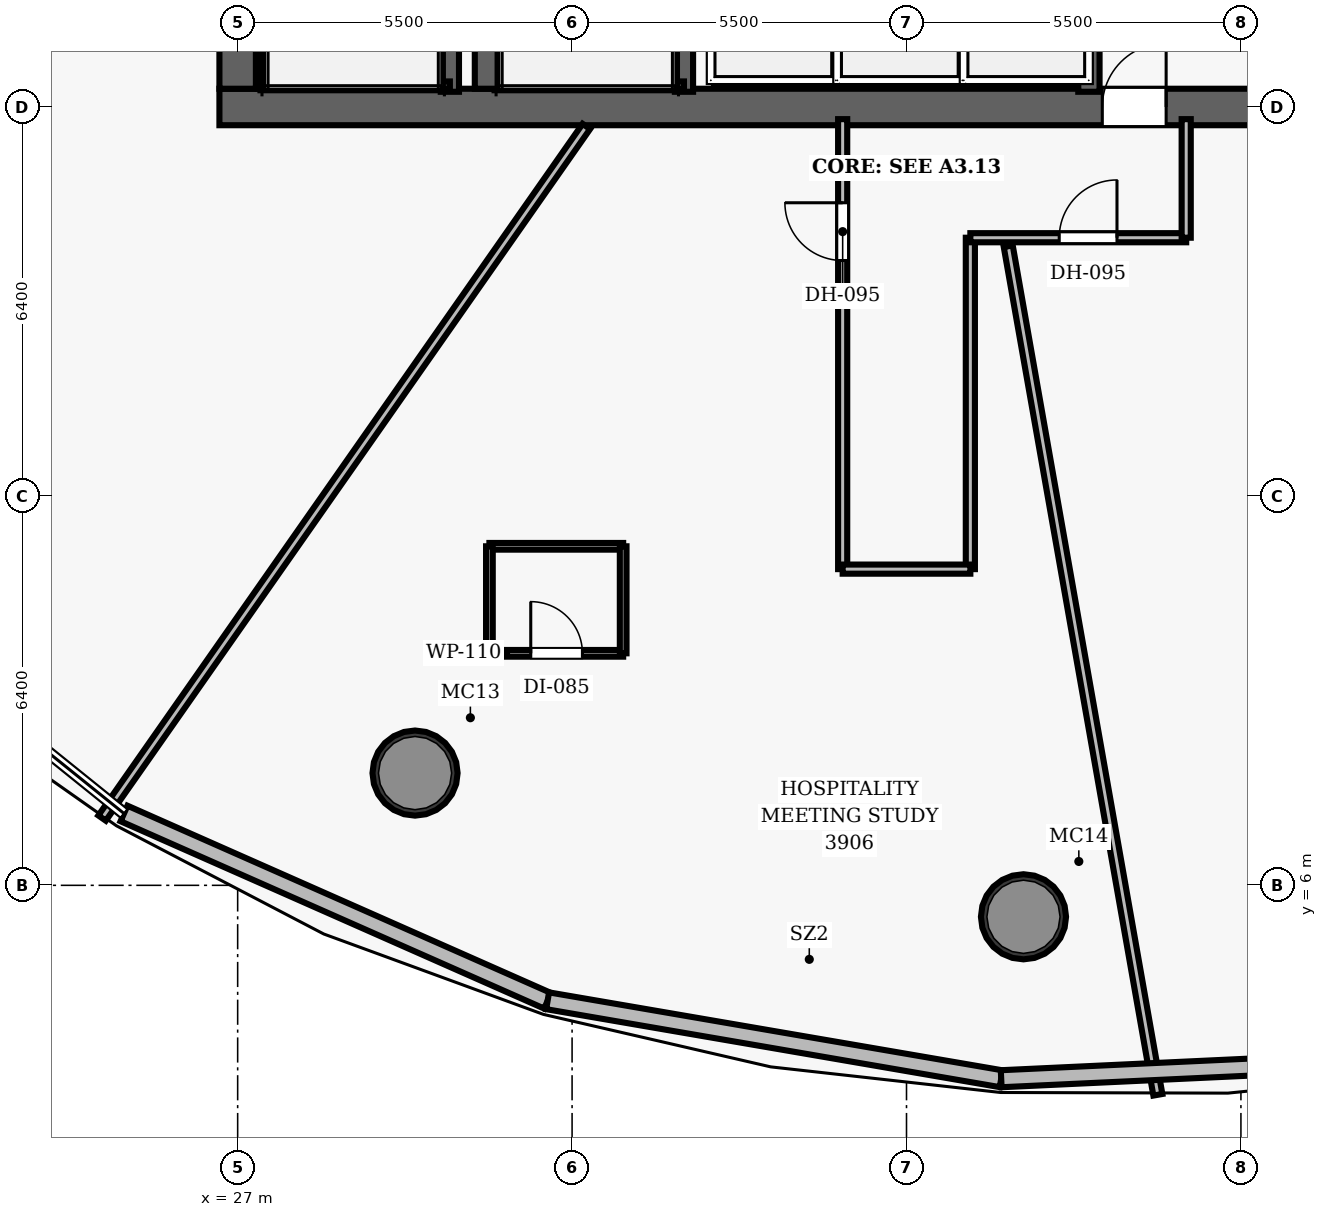
"""IFC4 building model, lengths in metres.
Left out: names, types, materials, properties, quantities, classifications, styles, units other than length and angle.
Written with IfcOpenShell. Run it as: python <this file> out.ifc"""

import sys

from ifc_helpers import new_model, si_unit, direction, frame, frame_2d, origin, origin_2d, place, context, subcontext, project, spatial, rectangle, hollow_circle, extrude, element, fill, save


model = new_model("IFC4")
c1 = context("Model", 3, precision=1e-05, world=origin(), true_north=direction((0.0, 1.0)))
c2 = subcontext(c1, "Body", "Model", "MODEL_VIEW")
j1 = project(units=[si_unit("LENGTHUNIT", "METRE"), si_unit("PLANEANGLEUNIT", "RADIAN")], contexts=[c1])
p1 = place(None, origin())
s1 = spatial("IfcSite", under=j1, at=p1, CompositionType="ELEMENT")
p2 = place(p1, origin())
s2 = spatial("IfcBuilding", under=s1, at=p2, CompositionType="ELEMENT")
p3 = place(p2, frame((0.0, 0.0, 155.3)))
s3 = spatial("IfcBuildingStorey", under=s2, at=p3, CompositionType="ELEMENT", Elevation=155.3)
p4 = place(p3, frame((26.7, 18.8, 0.0), z_axis=(0.0, 0.0, 1.0), x_axis=(1.0, 0.0, 0.0)))
e1 = element("IfcWall", 1, at=p4, inside=s3, PredefinedType="SHEAR", context=c2, shape_type="SweptSolid", body=[
    extrude(rectangle(XDim=22.6, YDim=0.6, at=frame_2d((11.3, 0.0))), origin(), (0.0, 0.0, 1.0), 3.5),
])
p5 = place(p4, frame((14.52, 0.0, 0.0)))
e2 = element("IfcOpeningElement", 2, at=p5, cuts=e1, PredefinedType="OPENING", context=c2, shape_type="SweptSolid", body=[
    extrude(rectangle(XDim=1.05, YDim=2.15, at=frame_2d((0.525, 1.075))), frame((0.0, 0.31, 0.0), z_axis=(0.0, -1.0, 0.0), x_axis=(1.0, 0.0, 0.0)), (0.0, 0.0, 1.0), 0.62),
])
p6 = place(p3, frame((27.0, 19.1, 0.0), z_axis=(0.0, 0.0, 1.0), x_axis=(0.0, 1.0, 0.0)))
e3 = element("IfcWall", 3, at=p6, inside=s3, PredefinedType="SHEAR", context=c2, shape_type="SweptSolid", body=[
    extrude(rectangle(XDim=13.8, YDim=0.6, at=frame_2d((6.9, 0.0))), origin(), (0.0, 0.0, 1.0), 3.5),
])
p7 = place(p6, frame((8.2, 0.0, 0.0)))
e4 = element("IfcOpeningElement", 4, at=p7, cuts=e3, PredefinedType="OPENING", context=c2, shape_type="SweptSolid", body=[
    extrude(rectangle(XDim=1.05, YDim=2.15, at=frame_2d((0.525, 1.075))), frame((0.0, 0.31, 0.0), z_axis=(0.0, -1.0, 0.0), x_axis=(1.0, 0.0, 0.0)), (0.0, 0.0, 1.0), 0.62),
])
p8 = place(p3, frame((31.1, 19.1, 0.0), z_axis=(0.0, 0.0, 1.0), x_axis=(0.0, 1.0, 0.0)))
e5 = element("IfcWall", 5, at=p8, inside=s3, PredefinedType="SHEAR", context=c2, shape_type="SweptSolid", body=[
    extrude(rectangle(XDim=13.8, YDim=0.4, at=frame_2d((6.9, 0.0))), origin(), (0.0, 0.0, 1.0), 3.5),
])
for number, where, z_axis, x_axis in (
    (6, (29.917, 7.846, 0.0), (0.0, 0.0, 1.0), (1.0, 0.0, 0.0)),
    (7, (39.924, 5.483, 0.0), (0.0, 0.0, 1.0), (1.0, 0.0, 0.0)),
):
    element("IfcColumn", number, at=place(p3, frame(where, z_axis=z_axis, x_axis=x_axis)), inside=s3, PredefinedType="COLUMN", context=c2, shape_type="SweptSolid", body=[
        extrude(hollow_circle(Radius=0.7, WallThickness=0.055, at=origin_2d()), origin(), (0.0, 0.0, 1.0), 3.5),
    ])
p9 = place(p3, frame((30.49, 19.05, 0.0), z_axis=(0.0, 0.0, 1.0), x_axis=(0.0, 1.0, 0.0)))
e8 = element("IfcWall", 8, at=p9, inside=s3, PredefinedType="SHEAR", context=c2, shape_type="SweptSolid", body=[
    extrude(rectangle(XDim=7.5, YDim=0.3, at=frame_2d((3.75, 0.0))), origin(), (0.0, 0.0, 1.0), 3.5),
])
p10 = place(p3, frame((27.395, 19.1, 0.0), z_axis=(0.0, 0.0, 1.0), x_axis=(0.0, 1.0, 0.0)))
e9 = element("IfcWall", 9, at=p10, inside=s3, PredefinedType="SHEAR", context=c2, shape_type="SweptSolid", body=[
    extrude(rectangle(XDim=7.45, YDim=0.12, at=frame_2d((3.725, 0.0))), origin(), (0.0, 0.0, 1.0), 3.5),
])
p11 = place(p3, frame((27.395, 19.16, 0.0), z_axis=(0.0, 0.0, 1.0), x_axis=(1.0, 0.0, 0.0)))
e10 = element("IfcWall", 10, at=p11, inside=s3, PredefinedType="SHEAR", context=c2, shape_type="SweptSolid", body=[
    extrude(rectangle(XDim=3.095, YDim=0.12, at=frame_2d((1.547, 0.0))), origin(), (0.0, 0.0, 1.0), 3.5),
])
p12 = place(p3, frame((34.34, 19.05, 0.0), z_axis=(0.0, 0.0, 1.0), x_axis=(0.0, 1.0, 0.0)))
e11 = element("IfcWall", 11, at=p12, inside=s3, PredefinedType="SHEAR", context=c2, shape_type="SweptSolid", body=[
    extrude(rectangle(XDim=7.5, YDim=0.3, at=frame_2d((3.75, 0.0))), origin(), (0.0, 0.0, 1.0), 3.5),
])
p13 = place(p3, frame((31.3, 19.16, 0.0), z_axis=(0.0, 0.0, 1.0), x_axis=(1.0, 0.0, 0.0)))
e12 = element("IfcWall", 12, at=p13, inside=s3, PredefinedType="SHEAR", context=c2, shape_type="SweptSolid", body=[
    extrude(rectangle(XDim=3.04, YDim=0.12, at=frame_2d((1.52, 0.0))), origin(), (0.0, 0.0, 1.0), 3.5),
])
p14 = place(p3, frame((41.0, 19.05, 0.0), z_axis=(0.0, 0.0, 1.0), x_axis=(0.0, 1.0, 0.0)))
e13 = element("IfcWall", 13, at=p14, inside=s3, PredefinedType="SHEAR", context=c2, shape_type="SweptSolid", body=[
    extrude(rectangle(XDim=2.08, YDim=0.35, at=frame_2d((1.04, 0.0))), origin(), (0.0, 0.0, 1.0), 2.675),
])
p15 = place(p3, frame((36.95, 11.2, 0.0), z_axis=(0.0, 0.0, 1.0), x_axis=(0.0, 1.0, 0.0)))
e14 = element("IfcWall", 14, at=p15, inside=s3, PredefinedType="PARTITIONING", context=c2, shape_type="SweptSolid", body=[
    extrude(rectangle(XDim=7.4, YDim=0.15, at=frame_2d((3.7, 0.0))), origin(), (0.0, 0.0, 1.0), 2.675),
])
p16 = place(p15, frame((5.075, 0.0, 0.0)))
e15 = element("IfcOpeningElement", 15, at=p16, cuts=e14, PredefinedType="OPENING", context=c2, shape_type="SweptSolid", body=[
    extrude(rectangle(XDim=0.95, YDim=2.15, at=frame_2d((0.475, 1.075))), frame((0.0, 0.085, 0.0), z_axis=(0.0, -1.0, 0.0), x_axis=(1.0, 0.0, 0.0)), (0.0, 0.0, 1.0), 0.17),
])
p17 = place(p3, frame((39.05, 11.2, 0.0), z_axis=(0.0, 0.0, 1.0), x_axis=(0.0, 1.0, 0.0)))
e16 = element("IfcWall", 16, at=p17, inside=s3, PredefinedType="PARTITIONING", context=c2, shape_type="SweptSolid", body=[
    extrude(rectangle(XDim=5.45, YDim=0.15, at=frame_2d((2.725, 0.0))), origin(), (0.0, 0.0, 1.0), 2.675),
])
p18 = place(p3, frame((39.05, 16.65, 0.0), z_axis=(0.0, 0.0, 1.0), x_axis=(1.0, 0.0, 0.0)))
e17 = element("IfcWall", 17, at=p18, inside=s3, PredefinedType="PARTITIONING", context=c2, shape_type="SweptSolid", body=[
    extrude(rectangle(XDim=3.55, YDim=0.15, at=frame_2d((1.775, 0.0))), origin(), (0.0, 0.0, 1.0), 2.675),
])
p19 = place(p18, frame((1.462, 0.0, 0.0)))
e18 = element("IfcOpeningElement", 18, at=p19, cuts=e17, PredefinedType="OPENING", context=c2, shape_type="SweptSolid", body=[
    extrude(rectangle(XDim=0.95, YDim=2.15, at=frame_2d((0.475, 1.075))), frame((0.0, 0.085, 0.0), z_axis=(0.0, -1.0, 0.0), x_axis=(1.0, 0.0, 0.0)), (0.0, 0.0, 1.0), 0.17),
])
p20 = place(p3, frame((42.6, 16.65, 0.0), z_axis=(0.0, 0.0, 1.0), x_axis=(0.0, 1.0, 0.0)))
e19 = element("IfcWall", 19, at=p20, inside=s3, PredefinedType="PARTITIONING", context=c2, shape_type="SweptSolid", body=[
    extrude(rectangle(XDim=1.95, YDim=0.15, at=frame_2d((0.975, 0.0))), origin(), (0.0, 0.0, 1.0), 2.675),
])
p21 = place(p3, frame((36.95, 11.2, 0.0), z_axis=(0.0, 0.0, 1.0), x_axis=(1.0, 0.0, 0.0)))
e20 = element("IfcWall", 20, at=p21, inside=s3, PredefinedType="PARTITIONING", context=c2, shape_type="SweptSolid", body=[
    extrude(rectangle(XDim=2.1, YDim=0.15, at=frame_2d((1.05, 0.0))), origin(), (0.0, 0.0, 1.0), 2.675),
])
p22 = place(p3, frame((32.734, 18.48, 0.0), z_axis=(0.0, 0.0, 1.0), x_axis=(-0.573573265071, -0.819154264834, 0.0)))
e21 = element("IfcWall", 21, at=p22, inside=s3, PredefinedType="PARTITIONING", context=c2, shape_type="SweptSolid", body=[
    extrude(rectangle(XDim=13.885, YDim=0.15, at=frame_2d((6.942, 0.0))), origin(), (0.0, 0.0, 1.0), 2.675),
])
p23 = place(p3, frame((39.673, 16.51, 0.0), z_axis=(0.0, 0.0, 1.0), x_axis=(0.173639863348, -0.984809219015, 0.0)))
e22 = element("IfcWall", 22, at=p23, inside=s3, PredefinedType="PARTITIONING", context=c2, shape_type="SweptSolid", body=[
    extrude(rectangle(XDim=14.17, YDim=0.15, at=frame_2d((7.085, 0.0))), origin(), (0.0, 0.0, 1.0), 2.675),
])
p24 = place(p3, frame((31.14, 9.815, 0.0), z_axis=(0.0, 0.0, 1.0), x_axis=(1.0, 0.0, 0.0)))
e23 = element("IfcWall", 23, at=p24, inside=s3, PredefinedType="PARTITIONING", context=c2, shape_type="SweptSolid", body=[
    extrude(rectangle(XDim=2.2, YDim=0.11, at=frame_2d((1.1, 0.0))), origin(), (0.0, 0.0, 1.0), 2.675),
])
p25 = place(p24, frame((0.68, 0.0, 0.0)))
e24 = element("IfcOpeningElement", 24, at=p25, cuts=e23, PredefinedType="OPENING", context=c2, shape_type="SweptSolid", body=[
    extrude(rectangle(XDim=0.85, YDim=2.1, at=frame_2d((0.425, 1.05))), frame((0.0, 0.065, 0.0), z_axis=(0.0, -1.0, 0.0), x_axis=(1.0, 0.0, 0.0)), (0.0, 0.0, 1.0), 0.13),
])
p26 = place(p3, frame((31.14, 11.575, 0.0), z_axis=(0.0, 0.0, 1.0), x_axis=(1.0, 0.0, 0.0)))
e25 = element("IfcWall", 25, at=p26, inside=s3, PredefinedType="PARTITIONING", context=c2, shape_type="SweptSolid", body=[
    extrude(rectangle(XDim=2.2, YDim=0.11, at=frame_2d((1.1, 0.0))), origin(), (0.0, 0.0, 1.0), 2.675),
])
for number, where, z_axis, x_axis in (
    (26, (31.14, 9.815, 0.0), (0.0, 0.0, 1.0), (0.0, 1.0, 0.0)),
    (27, (33.34, 9.815, 0.0), (0.0, 0.0, 1.0), (0.0, 1.0, 0.0)),
):
    element("IfcWall", number, at=place(p3, frame(where, z_axis=z_axis, x_axis=x_axis)), inside=s3, PredefinedType="PARTITIONING", context=c2, shape_type="SweptSolid", body=[
        extrude(rectangle(XDim=1.76, YDim=0.11, at=frame_2d((0.88, 0.0))), origin(), (0.0, 0.0, 1.0), 2.675),
    ])
p27 = place(p3, frame((32.097, 4.101, 0.0), z_axis=(0.0, 0.0, 1.0), x_axis=(-0.914590963811, 0.404380228147, 0.0)))
e28 = element("IfcWall", 28, at=p27, inside=s3, PredefinedType="SOLIDWALL", context=c2, shape_type="SweptSolid", body=[
    extrude(rectangle(XDim=7.617, YDim=0.28, at=frame_2d((3.809, 0.0))), origin(), (0.0, 0.0, 1.0), 3.26),
])
p28 = place(p3, frame((39.557, 2.82, 0.0), z_axis=(0.0, 0.0, 1.0), x_axis=(-0.985558648747, 0.169334432057, 0.0)))
e29 = element("IfcWall", 29, at=p28, inside=s3, PredefinedType="SOLIDWALL", context=c2, shape_type="SweptSolid", body=[
    extrude(rectangle(XDim=7.569, YDim=0.28, at=frame_2d((3.785, 0.0))), origin(), (0.0, 0.0, 1.0), 3.26),
])
p29 = place(p3, frame((46.841, 3.16, 0.0), z_axis=(0.0, 0.0, 1.0), x_axis=(-0.998910234394, -0.0466727289, 0.0)))
e30 = element("IfcWall", 30, at=p29, inside=s3, PredefinedType="SOLIDWALL", context=c2, shape_type="SweptSolid", body=[
    extrude(rectangle(XDim=7.292, YDim=0.28, at=frame_2d((3.646, 0.0))), origin(), (0.0, 0.0, 1.0), 3.26),
])
p30 = place(p5, origin())
e31 = element("IfcDoor", 31, at=p30, inside=s3, OperationType="SINGLE_SWING_RIGHT", PredefinedType="DOOR", context=c2, shape_type="SweptSolid", body=[
    extrude(rectangle(XDim=1.05, YDim=2.15, at=frame_2d((0.525, 1.075))), frame((0.0, 0.025, 0.0), z_axis=(0.0, -1.0, 0.0), x_axis=(1.0, 0.0, 0.0)), (0.0, 0.0, 1.0), 0.05),
])
fill(e2, e31)
p31 = place(p16, origin())
e32 = element("IfcDoor", 32, at=p31, inside=s3, OperationType="SINGLE_SWING_RIGHT", PredefinedType="DOOR", context=c2, shape_type="SweptSolid", body=[
    extrude(rectangle(XDim=0.95, YDim=2.15, at=frame_2d((0.475, 1.075))), frame((0.0, 0.025, 0.0), z_axis=(0.0, -1.0, 0.0), x_axis=(1.0, 0.0, 0.0)), (0.0, 0.0, 1.0), 0.05),
])
fill(e15, e32)
p32 = place(p25, origin())
e33 = element("IfcDoor", 33, at=p32, inside=s3, OperationType="SINGLE_SWING_LEFT", PredefinedType="DOOR", context=c2, shape_type="SweptSolid", body=[
    extrude(rectangle(XDim=0.85, YDim=2.1, at=frame_2d((0.425, 1.05))), frame((0.0, 0.025, 0.0), z_axis=(0.0, -1.0, 0.0), x_axis=(1.0, 0.0, 0.0)), (0.0, 0.0, 1.0), 0.05),
])
fill(e24, e33)
p33 = place(p19, origin())
e34 = element("IfcDoor", 34, at=p33, inside=s3, OperationType="SINGLE_SWING_RIGHT", PredefinedType="DOOR", context=c2, shape_type="SweptSolid", body=[
    extrude(rectangle(XDim=0.95, YDim=2.15, at=frame_2d((0.475, 1.075))), frame((0.0, 0.025, 0.0), z_axis=(0.0, -1.0, 0.0), x_axis=(1.0, 0.0, 0.0)), (0.0, 0.0, 1.0), 0.05),
])
fill(e18, e34)
save(model, sys.argv[1])
